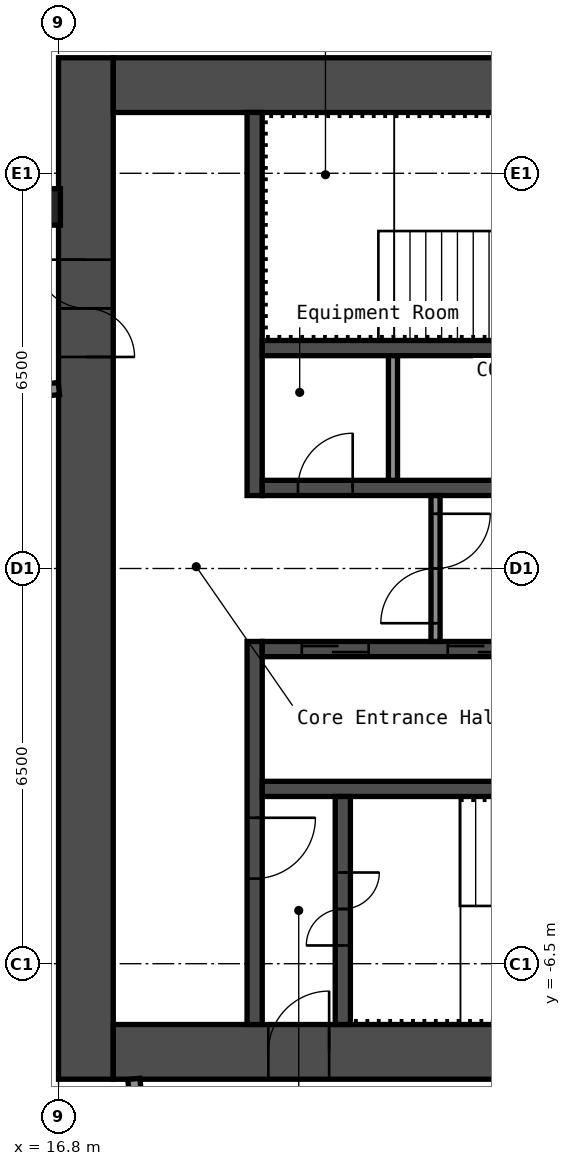
"""IFC4 building model, lengths in metres.
Left out: names, types, materials, properties, quantities, classifications, styles, units other than length and angle.
Written with IfcOpenShell. Run it as: python <this file> out.ifc"""

import sys

from ifc_helpers import new_model, si_unit, direction, frame, frame_2d, origin, origin_2d, place, context, subcontext, project, spatial, rectangle, hollow_rectangle, extrude, element, fill, save


model = new_model("IFC4")
c1 = context("Model", 3, precision=1e-05, world=origin(), true_north=direction((0.0, 1.0)))
c2 = subcontext(c1, "Body", "Model", "MODEL_VIEW")
j1 = project(units=[si_unit("LENGTHUNIT", "METRE"), si_unit("PLANEANGLEUNIT", "RADIAN")], contexts=[c1])
p1 = place(None, origin())
s1 = spatial("IfcSite", under=j1, at=p1, CompositionType="ELEMENT")
p2 = place(p1, origin())
s2 = spatial("IfcBuilding", under=s1, at=p2, CompositionType="ELEMENT")
p3 = place(p2, frame((0.0, 0.0, 255.0)))
s3 = spatial("IfcBuildingStorey", under=s2, at=p3, CompositionType="ELEMENT", Elevation=255.0)
p4 = place(p3, frame((16.53, 5.947, 0.0), z_axis=(0.0, 0.0, 1.0), x_axis=(1.0, 0.0, 0.0)))
e1 = element("IfcColumn", 1, at=p4, inside=s3, PredefinedType="COLUMN", context=c2, shape_type="SweptSolid", body=[
    extrude(hollow_rectangle(XDim=0.6, YDim=0.6, WallThickness=0.025, InnerFilletRadius=0.038, OuterFilletRadius=0.062, at=origin_2d()), origin(), (0.0, 0.0, 1.0), 2.75),
])
p5 = place(p3, frame((17.25, -8.4, 0.0), z_axis=(0.0, 0.0, 1.0), x_axis=(0.0, 1.0, 0.0)))
e2 = element("IfcWall", 2, at=p5, inside=s3, PredefinedType="SHEAR", context=c2, shape_type="SweptSolid", body=[
    extrude(rectangle(XDim=16.8, YDim=0.9, at=frame_2d((8.4, 0.0))), origin(), (0.0, 0.0, 1.0), 2.75),
])
p6 = place(p5, frame((11.879, 0.0, 0.0)))
e3 = element("IfcOpeningElement", 3, at=p6, cuts=e2, PredefinedType="OPENING", context=c2, shape_type="SweptSolid", body=[
    extrude(rectangle(XDim=1.6, YDim=2.1, at=frame_2d((0.8, 1.05))), frame((0.0, 0.46, 0.0), z_axis=(0.0, -1.0, 0.0), x_axis=(1.0, 0.0, 0.0)), (0.0, 0.0, 1.0), 0.92),
])
p7 = place(p3, frame((17.7, 7.95, 0.0), z_axis=(0.0, 0.0, 1.0), x_axis=(1.0, 0.0, 0.0)))
e4 = element("IfcWall", 4, at=p7, inside=s3, PredefinedType="SHEAR", context=c2, shape_type="SweptSolid", body=[
    extrude(rectangle(XDim=15.0, YDim=0.9, at=frame_2d((7.5, 0.0))), origin(), (0.0, 0.0, 1.0), 2.75),
])
p8 = place(p7, frame((10.4, 0.0, 0.0)))
e5 = element("IfcOpeningElement", 5, at=p8, cuts=e4, PredefinedType="OPENING", context=c2, shape_type="SweptSolid", body=[
    extrude(rectangle(XDim=1.2, YDim=2.1, at=frame_2d((0.6, 1.05))), frame((0.0, 0.46, 0.0), z_axis=(0.0, -1.0, 0.0), x_axis=(1.0, 0.0, 0.0)), (0.0, 0.0, 1.0), 0.92),
])
p9 = place(p7, frame((13.35, 0.0, 0.0)))
e6 = element("IfcOpeningElement", 6, at=p9, cuts=e4, PredefinedType="OPENING", context=c2, shape_type="SweptSolid", body=[
    extrude(rectangle(XDim=0.9, YDim=2.1, at=frame_2d((0.45, 1.05))), frame((0.0, 0.46, 0.0), z_axis=(0.0, -1.0, 0.0), x_axis=(1.0, 0.0, 0.0)), (0.0, 0.0, 1.0), 0.92),
])
p10 = place(p3, frame((17.7, -7.95, 0.0), z_axis=(0.0, 0.0, 1.0), x_axis=(1.0, 0.0, 0.0)))
e7 = element("IfcWall", 7, at=p10, inside=s3, PredefinedType="SHEAR", context=c2, shape_type="SweptSolid", body=[
    extrude(rectangle(XDim=15.0, YDim=0.9, at=frame_2d((7.5, 0.0))), origin(), (0.0, 0.0, 1.0), 2.75),
])
p11 = place(p10, frame((2.55, 0.0, 0.0)))
e8 = element("IfcOpeningElement", 8, at=p11, cuts=e7, PredefinedType="OPENING", context=c2, shape_type="SweptSolid", body=[
    extrude(rectangle(XDim=1.0, YDim=2.1, at=frame_2d((0.5, 1.05))), frame((0.0, 0.46, 0.0), z_axis=(0.0, -1.0, 0.0), x_axis=(1.0, 0.0, 0.0)), (0.0, 0.0, 1.0), 0.92),
])
p12 = place(p3, frame((20.025, 1.2, 0.0), z_axis=(0.0, 0.0, 1.0), x_axis=(0.0, 1.0, 0.0)))
e9 = element("IfcWall", 9, at=p12, inside=s3, PredefinedType="SHEAR", context=c2, shape_type="SweptSolid", body=[
    extrude(rectangle(XDim=6.3, YDim=0.25, at=frame_2d((3.15, 0.0))), origin(), (0.0, 0.0, 1.0), 2.75),
])
p13 = place(p3, frame((20.025, -7.5, 0.0), z_axis=(0.0, 0.0, 1.0), x_axis=(0.0, 1.0, 0.0)))
e10 = element("IfcWall", 10, at=p13, inside=s3, PredefinedType="SHEAR", context=c2, shape_type="SweptSolid", body=[
    extrude(rectangle(XDim=6.3, YDim=0.25, at=frame_2d((3.15, 0.0))), origin(), (0.0, 0.0, 1.0), 2.75),
])
p14 = place(p13, frame((2.4, 0.0, 0.0)))
e11 = element("IfcOpeningElement", 11, at=p14, cuts=e10, PredefinedType="OPENING", context=c2, shape_type="SweptSolid", body=[
    extrude(rectangle(XDim=1.0, YDim=2.1, at=frame_2d((0.5, 1.05))), frame((0.0, 0.135, 0.0), z_axis=(0.0, -1.0, 0.0), x_axis=(1.0, 0.0, 0.0)), (0.0, 0.0, 1.0), 0.27),
])
p15 = place(p3, frame((20.15, 1.325, 0.0), z_axis=(0.0, 0.0, 1.0), x_axis=(1.0, 0.0, 0.0)))
e12 = element("IfcWall", 12, at=p15, inside=s3, PredefinedType="SHEAR", context=c2, shape_type="SweptSolid", body=[
    extrude(rectangle(XDim=7.5, YDim=0.25, at=frame_2d((3.75, 0.0))), origin(), (0.0, 0.0, 1.0), 2.75),
])
p16 = place(p15, frame((0.587, 0.0, 0.0)))
e13 = element("IfcOpeningElement", 13, at=p16, cuts=e12, PredefinedType="OPENING", context=c2, shape_type="SweptSolid", body=[
    extrude(rectangle(XDim=0.9, YDim=2.1, at=frame_2d((0.45, 1.05))), frame((0.0, 0.135, 0.0), z_axis=(0.0, -1.0, 0.0), x_axis=(1.0, 0.0, 0.0)), (0.0, 0.0, 1.0), 0.27),
])
p17 = place(p15, frame((4.288, 0.0, 0.0)))
e14 = element("IfcOpeningElement", 14, at=p17, cuts=e12, PredefinedType="OPENING", context=c2, shape_type="SweptSolid", body=[
    extrude(rectangle(XDim=0.9, YDim=2.1, at=frame_2d((0.45, 1.05))), frame((0.0, 0.135, 0.0), z_axis=(0.0, -1.0, 0.0), x_axis=(1.0, 0.0, 0.0)), (0.0, 0.0, 1.0), 0.27),
])
p18 = place(p3, frame((20.15, 3.625, 0.0), z_axis=(0.0, 0.0, 1.0), x_axis=(1.0, 0.0, 0.0)))
e15 = element("IfcWall", 15, at=p18, inside=s3, PredefinedType="SHEAR", context=c2, shape_type="SweptSolid", body=[
    extrude(rectangle(XDim=7.5, YDim=0.25, at=frame_2d((3.75, 0.0))), origin(), (0.0, 0.0, 1.0), 2.75),
])
p19 = place(p3, frame((20.15, -1.325, 0.0), z_axis=(0.0, 0.0, 1.0), x_axis=(1.0, 0.0, 0.0)))
e16 = element("IfcWall", 16, at=p19, inside=s3, PredefinedType="SHEAR", context=c2, shape_type="SweptSolid", body=[
    extrude(rectangle(XDim=7.5, YDim=0.25, at=frame_2d((3.75, 0.0))), origin(), (0.0, 0.0, 1.0), 2.75),
])
p20 = place(p19, frame((0.65, 0.0, 0.0)))
e17 = element("IfcOpeningElement", 17, at=p20, cuts=e16, PredefinedType="OPENING", context=c2, shape_type="SweptSolid", body=[
    extrude(rectangle(XDim=1.1, YDim=2.1, at=frame_2d((0.55, 1.05))), frame((0.0, 0.135, 0.0), z_axis=(0.0, -1.0, 0.0), x_axis=(1.0, 0.0, 0.0)), (0.0, 0.0, 1.0), 0.27),
])
p21 = place(p19, frame((3.05, 0.0, 0.0)))
e18 = element("IfcOpeningElement", 18, at=p21, cuts=e16, PredefinedType="OPENING", context=c2, shape_type="SweptSolid", body=[
    extrude(rectangle(XDim=1.1, YDim=2.1, at=frame_2d((0.55, 1.05))), frame((0.0, 0.135, 0.0), z_axis=(0.0, -1.0, 0.0), x_axis=(1.0, 0.0, 0.0)), (0.0, 0.0, 1.0), 0.27),
])
p22 = place(p19, frame((5.45, 0.0, 0.0)))
e19 = element("IfcOpeningElement", 19, at=p22, cuts=e16, PredefinedType="OPENING", context=c2, shape_type="SweptSolid", body=[
    extrude(rectangle(XDim=1.1, YDim=2.1, at=frame_2d((0.55, 1.05))), frame((0.0, 0.135, 0.0), z_axis=(0.0, -1.0, 0.0), x_axis=(1.0, 0.0, 0.0)), (0.0, 0.0, 1.0), 0.27),
])
p23 = place(p3, frame((20.15, -3.625, 0.0), z_axis=(0.0, 0.0, 1.0), x_axis=(1.0, 0.0, 0.0)))
e20 = element("IfcWall", 20, at=p23, inside=s3, PredefinedType="SHEAR", context=c2, shape_type="SweptSolid", body=[
    extrude(rectangle(XDim=7.5, YDim=0.25, at=frame_2d((3.75, 0.0))), origin(), (0.0, 0.0, 1.0), 2.75),
])
p24 = place(p3, frame((21.475, -7.5, 0.0), z_axis=(0.0, 0.0, 1.0), x_axis=(0.0, 1.0, 0.0)))
e21 = element("IfcWall", 21, at=p24, inside=s3, PredefinedType="SHEAR", context=c2, shape_type="SweptSolid", body=[
    extrude(rectangle(XDim=3.75, YDim=0.25, at=frame_2d((1.875, 0.0))), origin(), (0.0, 0.0, 1.0), 2.75),
])
p25 = place(p24, frame((1.3, 0.0, 0.0)))
e22 = element("IfcOpeningElement", 22, at=p25, cuts=e21, PredefinedType="OPENING", context=c2, shape_type="SweptSolid", body=[
    extrude(rectangle(XDim=1.2, YDim=2.1, at=frame_2d((0.6, 1.05))), frame((0.0, 0.135, 0.0), z_axis=(0.0, -1.0, 0.0), x_axis=(1.0, 0.0, 0.0)), (0.0, 0.0, 1.0), 0.27),
])
p26 = place(p3, frame((23.0, -1.2, 0.0), z_axis=(0.0, 0.0, 1.0), x_axis=(0.0, 1.0, 0.0)))
e23 = element("IfcWall", 23, at=p26, inside=s3, PredefinedType="PARTITIONING", context=c2, shape_type="SweptSolid", body=[
    extrude(rectangle(XDim=2.4, YDim=0.15, at=frame_2d((1.2, 0.0))), origin(), (0.0, 0.0, 1.0), 2.75),
])
p27 = place(p26, frame((0.3, 0.0, 0.0)))
e24 = element("IfcOpeningElement", 24, at=p27, cuts=e23, PredefinedType="OPENING", context=c2, shape_type="SweptSolid", body=[
    extrude(rectangle(XDim=1.8, YDim=2.1, at=frame_2d((0.9, 1.05))), frame((0.0, 0.085, 0.0), z_axis=(0.0, -1.0, 0.0), x_axis=(1.0, 0.0, 0.0)), (0.0, 0.0, 1.0), 0.17),
])
p28 = place(p3, frame((22.3, 1.45, 0.0), z_axis=(0.0, 0.0, 1.0), x_axis=(0.0, 1.0, 0.0)))
e25 = element("IfcWall", 25, at=p28, inside=s3, PredefinedType="PARTITIONING", context=c2, shape_type="SweptSolid", body=[
    extrude(rectangle(XDim=2.05, YDim=0.15, at=frame_2d((1.025, 0.0))), origin(), (0.0, 0.0, 1.0), 2.75),
])
p29 = place(p3, frame((-16.572, -0.549, 0.0), z_axis=(0.0, 0.0, 1.0), x_axis=(0.994521146831, 0.104535584879, 0.0)))
e26 = element("IfcWall", 26, at=p29, inside=s3, PredefinedType="PARTITIONING", context=c2, shape_type="SweptSolid", body=[
    extrude(rectangle(XDim=33.561, YDim=0.2, at=frame_2d((16.78, 0.0))), origin(), (0.0, 0.0, 1.0), 2.75),
])
p30 = place(p29, frame((1.315, 0.0, 0.0)))
e27 = element("IfcOpeningElement", 27, at=p30, cuts=e26, PredefinedType="OPENING", context=c2, shape_type="SweptSolid", body=[
    extrude(rectangle(XDim=0.9, YDim=2.1, at=frame_2d((0.45, 1.05))), frame((0.0, 0.11, 0.0), z_axis=(0.0, -1.0, 0.0), x_axis=(1.0, 0.0, 0.0)), (0.0, 0.0, 1.0), 0.22),
])
p31 = place(p29, frame((5.515, 0.0, 0.0)))
e28 = element("IfcOpeningElement", 28, at=p31, cuts=e26, PredefinedType="OPENING", context=c2, shape_type="SweptSolid", body=[
    extrude(rectangle(XDim=0.9, YDim=2.1, at=frame_2d((0.45, 1.05))), frame((0.0, 0.11, 0.0), z_axis=(0.0, -1.0, 0.0), x_axis=(1.0, 0.0, 0.0)), (0.0, 0.0, 1.0), 0.22),
])
p32 = place(p29, frame((11.25, 0.0, 0.0)))
e29 = element("IfcOpeningElement", 29, at=p32, cuts=e26, PredefinedType="OPENING", context=c2, shape_type="SweptSolid", body=[
    extrude(rectangle(XDim=1.0, YDim=2.1, at=frame_2d((0.5, 1.05))), frame((0.0, 0.11, 0.0), z_axis=(0.0, -1.0, 0.0), x_axis=(1.0, 0.0, 0.0)), (0.0, 0.0, 1.0), 0.22),
])
p33 = place(p29, frame((12.95, 0.0, 0.0)))
e30 = element("IfcOpeningElement", 30, at=p33, cuts=e26, PredefinedType="OPENING", context=c2, shape_type="SweptSolid", body=[
    extrude(rectangle(XDim=1.0, YDim=2.1, at=frame_2d((0.5, 1.05))), frame((0.0, 0.11, 0.0), z_axis=(0.0, -1.0, 0.0), x_axis=(1.0, 0.0, 0.0)), (0.0, 0.0, 1.0), 0.22),
])
p34 = place(p29, frame((18.03, 0.0, 0.0)))
e31 = element("IfcOpeningElement", 31, at=p34, cuts=e26, PredefinedType="OPENING", context=c2, shape_type="SweptSolid", body=[
    extrude(rectangle(XDim=0.9, YDim=2.1, at=frame_2d((0.45, 1.05))), frame((0.0, 0.11, 0.0), z_axis=(0.0, -1.0, 0.0), x_axis=(1.0, 0.0, 0.0)), (0.0, 0.0, 1.0), 0.22),
])
p35 = place(p29, frame((22.23, 0.0, 0.0)))
e32 = element("IfcOpeningElement", 32, at=p35, cuts=e26, PredefinedType="OPENING", context=c2, shape_type="SweptSolid", body=[
    extrude(rectangle(XDim=0.9, YDim=2.1, at=frame_2d((0.45, 1.05))), frame((0.0, 0.11, 0.0), z_axis=(0.0, -1.0, 0.0), x_axis=(1.0, 0.0, 0.0)), (0.0, 0.0, 1.0), 0.22),
])
p36 = place(p29, frame((28.9, 0.0, 0.0)))
e33 = element("IfcOpeningElement", 33, at=p36, cuts=e26, PredefinedType="OPENING", context=c2, shape_type="SweptSolid", body=[
    extrude(rectangle(XDim=1.0, YDim=2.1, at=frame_2d((0.5, 1.05))), frame((0.0, 0.11, 0.0), z_axis=(0.0, -1.0, 0.0), x_axis=(1.0, 0.0, 0.0)), (0.0, 0.0, 1.0), 0.22),
])
p37 = place(p3, frame((18.516, -12.949, 0.0), z_axis=(0.0, 0.0, 1.0), x_axis=(-0.104548796268, 0.994519758074, 0.0)))
e34 = element("IfcWall", 34, at=p37, inside=s3, PredefinedType="PARTITIONING", context=c2, shape_type="SweptSolid", body=[
    extrude(rectangle(XDim=4.579, YDim=0.2, at=frame_2d((2.29, 0.0))), origin(), (0.0, 0.0, 1.0), 2.75),
])
p38 = place(p6, origin())
e35 = element("IfcDoor", 35, at=p38, inside=s3, OperationType="DOUBLE_DOOR_SINGLE_SWING", PredefinedType="DOOR", context=c2, shape_type="SweptSolid", body=[
    extrude(rectangle(XDim=1.6, YDim=2.1, at=frame_2d((0.8, 1.05))), frame((0.0, 0.025, 0.0), z_axis=(0.0, -1.0, 0.0), x_axis=(1.0, 0.0, 0.0)), (0.0, 0.0, 1.0), 0.05),
])
fill(e3, e35)
p39 = place(p11, origin())
e36 = element("IfcDoor", 36, at=p39, inside=s3, OperationType="SINGLE_SWING_LEFT", PredefinedType="DOOR", context=c2, shape_type="SweptSolid", body=[
    extrude(rectangle(XDim=1.0, YDim=2.1, at=frame_2d((0.5, 1.05))), frame((0.0, 0.025, 0.0), z_axis=(0.0, -1.0, 0.0), x_axis=(1.0, 0.0, 0.0)), (0.0, 0.0, 1.0), 0.05),
])
fill(e8, e36)
p40 = place(p25, origin())
e37 = element("IfcDoor", 37, at=p40, inside=s3, OperationType="DOUBLE_DOOR_SINGLE_SWING", PredefinedType="DOOR", context=c2, shape_type="SweptSolid", body=[
    extrude(rectangle(XDim=1.2, YDim=2.1, at=frame_2d((0.6, 1.05))), frame((0.0, 0.025, 0.0), z_axis=(0.0, -1.0, 0.0), x_axis=(1.0, 0.0, 0.0)), (0.0, 0.0, 1.0), 0.05),
])
fill(e22, e37)
p41 = place(p14, origin())
e38 = element("IfcDoor", 38, at=p41, inside=s3, OperationType="SINGLE_SWING_RIGHT", PredefinedType="DOOR", context=c2, shape_type="SweptSolid", body=[
    extrude(rectangle(XDim=1.0, YDim=2.1, at=frame_2d((0.5, 1.05))), frame((0.0, 0.025, 0.0), z_axis=(0.0, -1.0, 0.0), x_axis=(1.0, 0.0, 0.0)), (0.0, 0.0, 1.0), 0.05),
])
fill(e11, e38)
p42 = place(p27, origin())
e39 = element("IfcDoor", 39, at=p42, inside=s3, OperationType="DOUBLE_DOOR_SINGLE_SWING", PredefinedType="DOOR", context=c2, shape_type="SweptSolid", body=[
    extrude(rectangle(XDim=1.8, YDim=2.1, at=frame_2d((0.9, 1.05))), frame((0.0, 0.025, 0.0), z_axis=(0.0, -1.0, 0.0), x_axis=(1.0, 0.0, 0.0)), (0.0, 0.0, 1.0), 0.05),
])
fill(e24, e39)
p43 = place(p16, origin())
e40 = element("IfcDoor", 40, at=p43, inside=s3, OperationType="SINGLE_SWING_LEFT", PredefinedType="DOOR", context=c2, shape_type="SweptSolid", body=[
    extrude(rectangle(XDim=0.9, YDim=2.1, at=frame_2d((0.45, 1.05))), frame((0.0, 0.025, 0.0), z_axis=(0.0, -1.0, 0.0), x_axis=(1.0, 0.0, 0.0)), (0.0, 0.0, 1.0), 0.05),
])
fill(e13, e40)
p44 = place(p20, origin())
e41 = element("IfcDoor", 41, at=p44, inside=s3, OperationType="DOUBLE_DOOR_SLIDING", PredefinedType="DOOR", context=c2, shape_type="SweptSolid", body=[
    extrude(rectangle(XDim=1.1, YDim=2.1, at=frame_2d((0.55, 1.05))), frame((0.0, 0.025, 0.0), z_axis=(0.0, -1.0, 0.0), x_axis=(1.0, 0.0, 0.0)), (0.0, 0.0, 1.0), 0.05),
])
fill(e17, e41)
p45 = place(p21, origin())
e42 = element("IfcDoor", 42, at=p45, inside=s3, OperationType="DOUBLE_DOOR_SLIDING", PredefinedType="DOOR", context=c2, shape_type="SweptSolid", body=[
    extrude(rectangle(XDim=1.1, YDim=2.1, at=frame_2d((0.55, 1.05))), frame((0.0, 0.025, 0.0), z_axis=(0.0, -1.0, 0.0), x_axis=(1.0, 0.0, 0.0)), (0.0, 0.0, 1.0), 0.05),
])
fill(e18, e42)
save(model, sys.argv[1])
